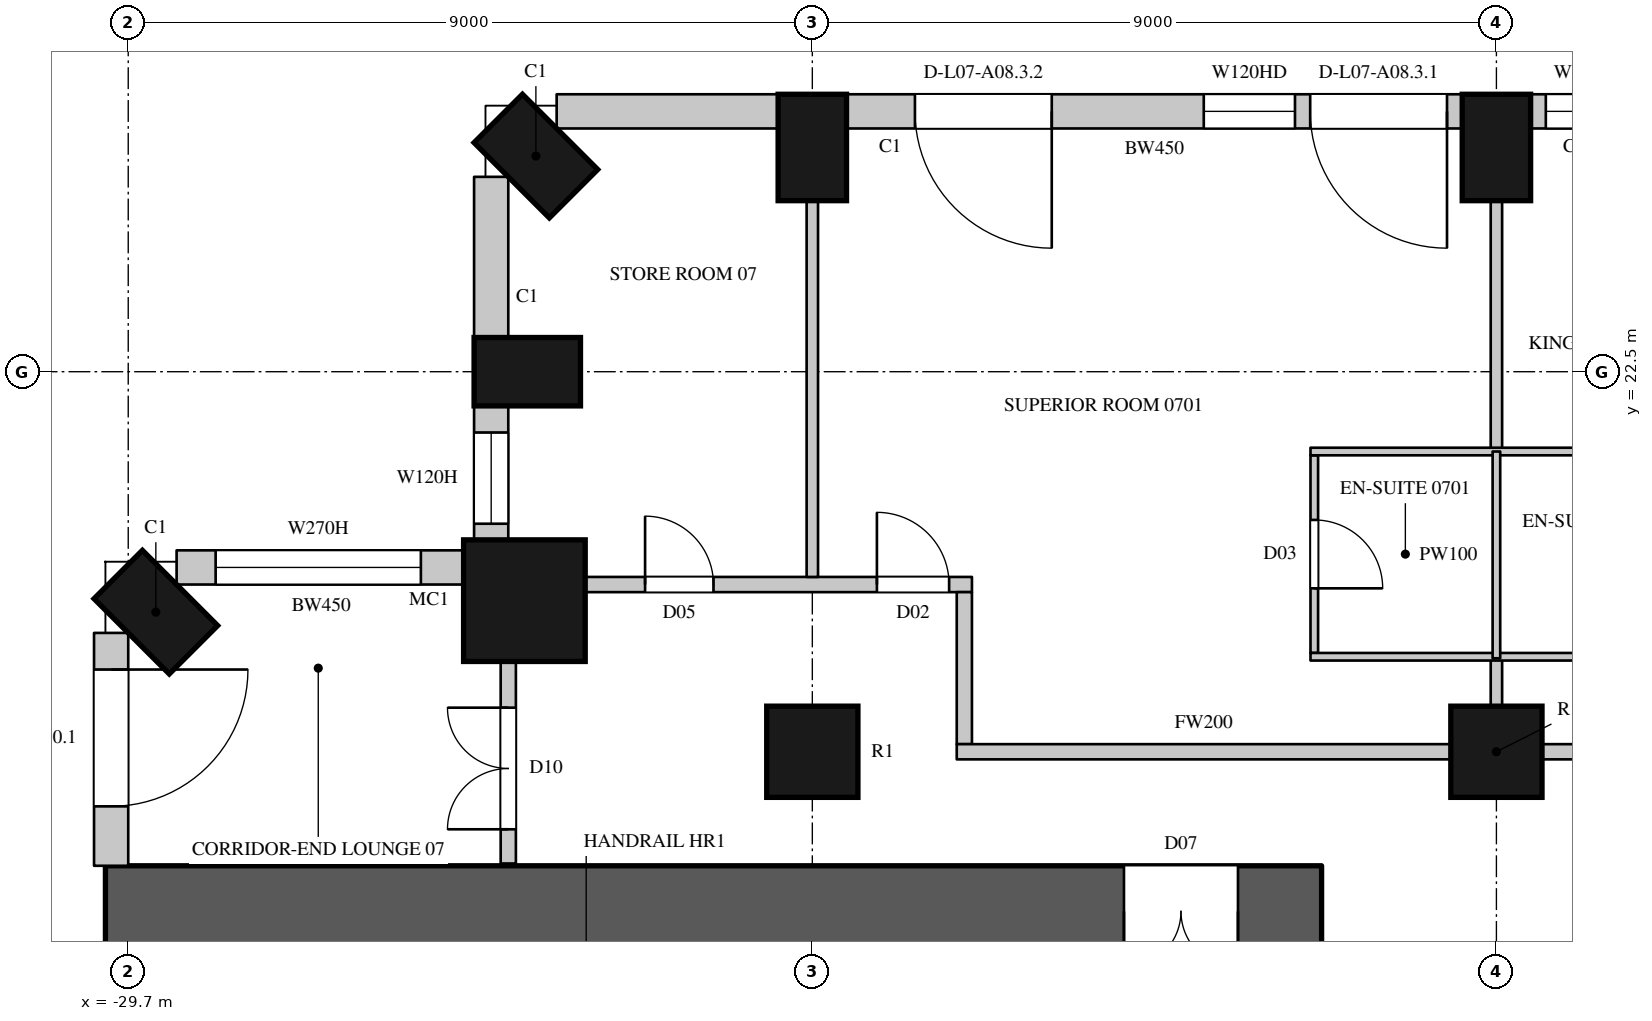
"""IFC4 building model, lengths in metres.
Left out: names, types, materials, properties, quantities, classifications, styles, units other than length and angle.
Written with IfcOpenShell. Run it as: python <this file> out.ifc"""

import sys

from ifc_helpers import new_model, si_unit, direction, frame, frame_2d, origin, origin_2d, place, context, subcontext, project, spatial, rectangle, circle, extrude, element, fill, save


model = new_model("IFC4")
c1 = context("Model", 3, precision=1e-05, world=origin(), true_north=direction((0.0, 1.0)))
c2 = subcontext(c1, "Body", "Model", "MODEL_VIEW")
j1 = project(units=[si_unit("LENGTHUNIT", "METRE"), si_unit("PLANEANGLEUNIT", "RADIAN")], contexts=[c1])
p1 = place(None, origin())
s1 = spatial("IfcSite", under=j1, at=p1, CompositionType="ELEMENT")
p2 = place(p1, origin())
s2 = spatial("IfcBuilding", under=s1, at=p2, CompositionType="ELEMENT")
p3 = place(p2, frame((0.0, 0.0, 55.5)))
s3 = spatial("IfcBuildingStorey", under=s2, at=p3, CompositionType="ELEMENT", Elevation=55.5)
for number, where, z_axis, x_axis in (
    (1, (-29.337, 19.337, 0.0), (0.0, 0.0, 1.0), (-0.707, -0.707, 0.0)),
    (2, (-11.7, 25.45, 0.0), (0.0, 0.0, 1.0), (-1.0, 0.0, 0.0)),
    (3, (-20.7, 25.45, 0.0), (0.0, 0.0, 1.0), (-1.0, 0.0, 0.0)),
    (4, (-24.337, 25.337, 0.0), (0.0, 0.0, 1.0), (-0.707, -0.707, 0.0)),
    (5, (-24.45, 22.5, 0.0), (0.0, 0.0, 1.0), (0.0, -1.0, 0.0)),
):
    element("IfcColumn", number, at=place(p3, frame(where, z_axis=z_axis, x_axis=x_axis)), inside=s3, PredefinedType="COLUMN", context=c2, shape_type="SweptSolid", body=[
        extrude(rectangle(XDim=0.9, YDim=1.4, at=origin_2d()), origin(), (0.0, 0.0, 1.0), 3.6),
    ])
p4 = place(p3, frame((-24.488, 19.488, 0.0), z_axis=(0.0, 0.0, 1.0), x_axis=(1.0, 0.0, 0.0)))
e6 = element("IfcColumn", 6, at=p4, inside=s3, PredefinedType="COLUMN", context=c2, shape_type="SweptSolid", body=[
    extrude(circle(Radius=0.8, at=origin_2d()), origin(), (0.0, 0.0, 1.0), 3.6),
])
for number, where, z_axis, x_axis in (
    (7, (-20.7, 17.5, 0.0), (0.0, 0.0, 1.0), (1.0, 0.0, 0.0)),
    (8, (-11.7, 17.5, 0.0), (0.0, 0.0, 1.0), (1.0, 0.0, 0.0)),
):
    element("IfcColumn", number, at=place(p3, frame(where, z_axis=z_axis, x_axis=x_axis)), inside=s3, PredefinedType="COLUMN", context=c2, shape_type="SweptSolid", body=[
        extrude(circle(Radius=0.6, at=origin_2d()), origin(), (0.0, 0.0, 1.0), 3.6),
    ])
p5 = place(p3, frame((-29.925, 19.064, 0.0), z_axis=(0.0, 0.0, 1.0), x_axis=(0.0, -1.0, 0.0)))
e9 = element("IfcWall", 9, at=p5, inside=s3, PredefinedType="SOLIDWALL", context=c2, shape_type="SweptSolid", body=[
    extrude(rectangle(XDim=3.064, YDim=0.45, at=frame_2d((1.532, 0.0))), origin(), (0.0, 0.0, 1.0), 3.3),
])
p6 = place(p5, frame((0.482, 0.0, 0.0)))
e10 = element("IfcOpeningElement", 10, at=p6, cuts=e9, PredefinedType="OPENING", context=c2, shape_type="SweptSolid", body=[
    extrude(rectangle(XDim=1.8, YDim=2.4, at=frame_2d((0.9, 1.2))), frame((0.0, 0.235, 0.0), z_axis=(0.0, -1.0, 0.0), x_axis=(1.0, 0.0, 0.0)), (0.0, 0.0, 1.0), 0.47),
])
p7 = place(p3, frame((-3.15, 25.925, 0.0), z_axis=(0.0, 0.0, 1.0), x_axis=(-1.0, 0.0, 0.0)))
e11 = element("IfcWall", 11, at=p7, inside=s3, PredefinedType="SOLIDWALL", context=c2, shape_type="SweptSolid", body=[
    extrude(rectangle(XDim=8.1, YDim=0.45, at=frame_2d((4.05, 0.0))), origin(), (0.0, 0.0, 1.0), 3.3),
])
p8 = place(p7, frame((0.2, 0.0, 0.0)))
e12 = element("IfcOpeningElement", 12, at=p8, cuts=e11, PredefinedType="OPENING", context=c2, shape_type="SweptSolid", body=[
    extrude(rectangle(XDim=1.8, YDim=2.4, at=frame_2d((0.9, 1.2))), frame((0.0, 0.235, 0.0), z_axis=(0.0, -1.0, 0.0), x_axis=(1.0, 0.0, 0.0)), (0.0, 0.0, 1.0), 0.47),
])
p9 = place(p7, frame((2.2, 0.0, 1.05)))
e13 = element("IfcOpeningElement", 13, at=p9, cuts=e11, PredefinedType="OPENING", context=c2, shape_type="SweptSolid", body=[
    extrude(rectangle(XDim=1.2, YDim=2.0, at=frame_2d((0.6, 1.0))), frame((0.0, 0.235, 0.0), z_axis=(0.0, -1.0, 0.0), x_axis=(1.0, 0.0, 0.0)), (0.0, 0.0, 1.0), 0.47),
])
p10 = place(p7, frame((4.7, 0.0, 0.0)))
e14 = element("IfcOpeningElement", 14, at=p10, cuts=e11, PredefinedType="OPENING", context=c2, shape_type="SweptSolid", body=[
    extrude(rectangle(XDim=1.8, YDim=2.4, at=frame_2d((0.9, 1.2))), frame((0.0, 0.235, 0.0), z_axis=(0.0, -1.0, 0.0), x_axis=(1.0, 0.0, 0.0)), (0.0, 0.0, 1.0), 0.47),
])
p11 = place(p7, frame((6.7, 0.0, 1.05)))
e15 = element("IfcOpeningElement", 15, at=p11, cuts=e11, PredefinedType="OPENING", context=c2, shape_type="SweptSolid", body=[
    extrude(rectangle(XDim=1.2, YDim=2.0, at=frame_2d((0.6, 1.0))), frame((0.0, 0.235, 0.0), z_axis=(0.0, -1.0, 0.0), x_axis=(1.0, 0.0, 0.0)), (0.0, 0.0, 1.0), 0.47),
])
p12 = place(p3, frame((-12.15, 25.925, 0.0), z_axis=(0.0, 0.0, 1.0), x_axis=(-1.0, 0.0, 0.0)))
e16 = element("IfcWall", 16, at=p12, inside=s3, PredefinedType="SOLIDWALL", context=c2, shape_type="SweptSolid", body=[
    extrude(rectangle(XDim=8.1, YDim=0.45, at=frame_2d((4.05, 0.0))), origin(), (0.0, 0.0, 1.0), 3.3),
])
p13 = place(p12, frame((0.2, 0.0, 0.0)))
e17 = element("IfcOpeningElement", 17, at=p13, cuts=e16, PredefinedType="OPENING", context=c2, shape_type="SweptSolid", body=[
    extrude(rectangle(XDim=1.8, YDim=2.4, at=frame_2d((0.9, 1.2))), frame((0.0, 0.235, 0.0), z_axis=(0.0, -1.0, 0.0), x_axis=(1.0, 0.0, 0.0)), (0.0, 0.0, 1.0), 0.47),
])
p14 = place(p12, frame((2.2, 0.0, 1.05)))
e18 = element("IfcOpeningElement", 18, at=p14, cuts=e16, PredefinedType="OPENING", context=c2, shape_type="SweptSolid", body=[
    extrude(rectangle(XDim=1.2, YDim=2.0, at=frame_2d((0.6, 1.0))), frame((0.0, 0.235, 0.0), z_axis=(0.0, -1.0, 0.0), x_axis=(1.0, 0.0, 0.0)), (0.0, 0.0, 1.0), 0.47),
])
p15 = place(p12, frame((5.4, 0.0, 0.0)))
e19 = element("IfcOpeningElement", 19, at=p15, cuts=e16, PredefinedType="OPENING", context=c2, shape_type="SweptSolid", body=[
    extrude(rectangle(XDim=1.8, YDim=2.4, at=frame_2d((0.9, 1.2))), frame((0.0, 0.235, 0.0), z_axis=(0.0, -1.0, 0.0), x_axis=(1.0, 0.0, 0.0)), (0.0, 0.0, 1.0), 0.47),
])
p16 = place(p3, frame((-21.15, 25.925, 0.0), z_axis=(0.0, 0.0, 1.0), x_axis=(-1.0, 0.0, 0.0)))
e20 = element("IfcWall", 20, at=p16, inside=s3, PredefinedType="SOLIDWALL", context=c2, shape_type="SweptSolid", body=[
    extrude(rectangle(XDim=2.914, YDim=0.45, at=frame_2d((1.457, 0.0))), origin(), (0.0, 0.0, 1.0), 3.3),
])
p17 = place(p3, frame((-24.925, 25.064, 0.0), z_axis=(0.0, 0.0, 1.0), x_axis=(0.0, -1.0, 0.0)))
e21 = element("IfcWall", 21, at=p17, inside=s3, PredefinedType="SOLIDWALL", context=c2, shape_type="SweptSolid", body=[
    extrude(rectangle(XDim=2.114, YDim=0.45, at=frame_2d((1.057, 0.0))), origin(), (0.0, 0.0, 1.0), 3.3),
])
p18 = place(p3, frame((-24.925, 22.05, 0.0), z_axis=(0.0, 0.0, 1.0), x_axis=(0.0, -1.0, 0.0)))
e22 = element("IfcWall", 22, at=p18, inside=s3, PredefinedType="SOLIDWALL", context=c2, shape_type="SweptSolid", body=[
    extrude(rectangle(XDim=1.792, YDim=0.45, at=frame_2d((0.896, 0.0))), origin(), (0.0, 0.0, 1.0), 3.3),
])
p19 = place(p18, frame((0.35, 0.0, 1.05)))
e23 = element("IfcOpeningElement", 23, at=p19, cuts=e22, PredefinedType="OPENING", context=c2, shape_type="SweptSolid", body=[
    extrude(rectangle(XDim=1.2, YDim=2.0, at=frame_2d((0.6, 1.0))), frame((0.0, 0.235, 0.0), z_axis=(0.0, -1.0, 0.0), x_axis=(1.0, 0.0, 0.0)), (0.0, 0.0, 1.0), 0.47),
])
p20 = place(p3, frame((-25.259, 19.925, 0.0), z_axis=(0.0, 0.0, 1.0), x_axis=(-1.0, 0.0, 0.0)))
e24 = element("IfcWall", 24, at=p20, inside=s3, PredefinedType="SOLIDWALL", context=c2, shape_type="SweptSolid", body=[
    extrude(rectangle(XDim=3.805, YDim=0.45, at=frame_2d((1.903, 0.0))), origin(), (0.0, 0.0, 1.0), 3.3),
])
p21 = place(p20, frame((0.592, 0.0, 1.05)))
e25 = element("IfcOpeningElement", 25, at=p21, cuts=e24, PredefinedType="OPENING", context=c2, shape_type="SweptSolid", body=[
    extrude(rectangle(XDim=2.7, YDim=2.0, at=frame_2d((1.35, 1.0))), frame((0.0, 0.235, 0.0), z_axis=(0.0, -1.0, 0.0), x_axis=(1.0, 0.0, 0.0)), (0.0, 0.0, 1.0), 0.47),
])
p22 = place(p3, frame((-30.0, 15.4, 0.0), z_axis=(0.0, 0.0, 1.0), x_axis=(1.0, 0.0, 0.0)))
e26 = element("IfcWall", 26, at=p22, inside=s3, PredefinedType="SHEAR", context=c2, shape_type="SweptSolid", body=[
    extrude(rectangle(XDim=16.0, YDim=1.2, at=frame_2d((8.0, 0.0))), origin(), (0.0, 0.0, 1.0), 3.6),
])
p23 = place(p22, frame((13.4, 0.0, 0.0)))
e27 = element("IfcOpeningElement", 27, at=p23, cuts=e26, PredefinedType="OPENING", context=c2, shape_type="SweptSolid", body=[
    extrude(rectangle(XDim=1.5, YDim=2.4, at=frame_2d((0.75, 1.2))), frame((0.0, 0.61, 0.0), z_axis=(0.0, -1.0, 0.0), x_axis=(1.0, 0.0, 0.0)), (0.0, 0.0, 1.0), 1.22),
])
p24 = place(p3, frame((-24.7, 16.03, 0.0), z_axis=(0.0, 0.0, 1.0), x_axis=(0.0, 1.0, 0.0)))
e28 = element("IfcWall", 28, at=p24, inside=s3, PredefinedType="PARTITIONING", context=c2, shape_type="SweptSolid", body=[
    extrude(rectangle(XDim=2.67, YDim=0.2, at=frame_2d((1.335, 0.0))), origin(), (0.0, 0.0, 1.0), 3.3),
])
p25 = place(p24, frame((0.45, 0.0, 0.0)))
e29 = element("IfcOpeningElement", 29, at=p25, cuts=e28, PredefinedType="OPENING", context=c2, shape_type="SweptSolid", body=[
    extrude(rectangle(XDim=1.6, YDim=2.4, at=frame_2d((0.8, 1.2))), frame((0.0, 0.11, 0.0), z_axis=(0.0, -1.0, 0.0), x_axis=(1.0, 0.0, 0.0)), (0.0, 0.0, 1.0), 0.22),
])
p26 = place(p3, frame((-23.7, 19.7, 0.0), z_axis=(0.0, 0.0, 1.0), x_axis=(1.0, 0.0, 0.0)))
e30 = element("IfcWall", 30, at=p26, inside=s3, PredefinedType="PARTITIONING", context=c2, shape_type="SweptSolid", body=[
    extrude(rectangle(XDim=5.1, YDim=0.2, at=frame_2d((2.55, 0.0))), origin(), (0.0, 0.0, 1.0), 3.3),
])
p27 = place(p26, frame((0.8, 0.0, 0.0)))
e31 = element("IfcOpeningElement", 31, at=p27, cuts=e30, PredefinedType="OPENING", context=c2, shape_type="SweptSolid", body=[
    extrude(rectangle(XDim=0.9, YDim=2.2, at=frame_2d((0.45, 1.1))), frame((0.0, 0.11, 0.0), z_axis=(0.0, -1.0, 0.0), x_axis=(1.0, 0.0, 0.0)), (0.0, 0.0, 1.0), 0.22),
])
p28 = place(p26, frame((3.85, 0.0, 0.0)))
e32 = element("IfcOpeningElement", 32, at=p28, cuts=e30, PredefinedType="OPENING", context=c2, shape_type="SweptSolid", body=[
    extrude(rectangle(XDim=0.95, YDim=2.2, at=frame_2d((0.475, 1.1))), frame((0.0, 0.11, 0.0), z_axis=(0.0, -1.0, 0.0), x_axis=(1.0, 0.0, 0.0)), (0.0, 0.0, 1.0), 0.22),
])
p29 = place(p3, frame((-18.7, 17.6, 0.0), z_axis=(0.0, 0.0, 1.0), x_axis=(0.0, 1.0, 0.0)))
e33 = element("IfcWall", 33, at=p29, inside=s3, PredefinedType="PARTITIONING", context=c2, shape_type="SweptSolid", body=[
    extrude(rectangle(XDim=2.0, YDim=0.2, at=frame_2d((1.0, 0.0))), origin(), (0.0, 0.0, 1.0), 3.3),
])
p30 = place(p3, frame((-18.8, 17.5, 0.0), z_axis=(0.0, 0.0, 1.0), x_axis=(1.0, 0.0, 0.0)))
e34 = element("IfcWall", 34, at=p30, inside=s3, PredefinedType="PARTITIONING", context=c2, shape_type="SweptSolid", body=[
    extrude(rectangle(XDim=6.5, YDim=0.2, at=frame_2d((3.25, 0.0))), origin(), (0.0, 0.0, 1.0), 2.75),
])
p31 = place(p3, frame((-11.1, 17.5, 0.0), z_axis=(0.0, 0.0, 1.0), x_axis=(1.0, 0.0, 0.0)))
e35 = element("IfcWall", 35, at=p31, inside=s3, PredefinedType="PARTITIONING", context=c2, shape_type="SweptSolid", body=[
    extrude(rectangle(XDim=7.8, YDim=0.2, at=frame_2d((3.9, 0.0))), origin(), (0.0, 0.0, 1.0), 2.75),
])
p32 = place(p31, frame((2.35, 0.0, 0.0)))
e36 = element("IfcOpeningElement", 36, at=p32, cuts=e35, PredefinedType="OPENING", context=c2, shape_type="SweptSolid", body=[
    extrude(rectangle(XDim=0.95, YDim=2.2, at=frame_2d((0.475, 1.1))), frame((0.0, 0.11, 0.0), z_axis=(0.0, -1.0, 0.0), x_axis=(1.0, 0.0, 0.0)), (0.0, 0.0, 1.0), 0.22),
])
p33 = place(p31, frame((5.2, 0.0, 0.0)))
e37 = element("IfcOpeningElement", 37, at=p33, cuts=e35, PredefinedType="OPENING", context=c2, shape_type="SweptSolid", body=[
    extrude(rectangle(XDim=0.95, YDim=2.2, at=frame_2d((0.475, 1.1))), frame((0.0, 0.11, 0.0), z_axis=(0.0, -1.0, 0.0), x_axis=(1.0, 0.0, 0.0)), (0.0, 0.0, 1.0), 0.22),
])
p34 = place(p3, frame((-20.7, 19.8, 0.0), z_axis=(0.0, 0.0, 1.0), x_axis=(0.0, 1.0, 0.0)))
e38 = element("IfcWall", 38, at=p34, inside=s3, PredefinedType="PARTITIONING", context=c2, shape_type="SweptSolid", body=[
    extrude(rectangle(XDim=4.95, YDim=0.15, at=frame_2d((2.475, 0.0))), origin(), (0.0, 0.0, 1.0), 2.75),
])
p35 = place(p3, frame((-11.7, 18.1, 0.0), z_axis=(0.0, 0.0, 1.0), x_axis=(0.0, 1.0, 0.0)))
e39 = element("IfcWall", 39, at=p35, inside=s3, PredefinedType="PARTITIONING", context=c2, shape_type="SweptSolid", body=[
    extrude(rectangle(XDim=0.63, YDim=0.15, at=frame_2d((0.315, 0.0))), origin(), (0.0, 0.0, 1.0), 2.75),
])
p36 = place(p3, frame((-11.7, 21.45, 0.0), z_axis=(0.0, 0.0, 1.0), x_axis=(0.0, 1.0, 0.0)))
e40 = element("IfcWall", 40, at=p36, inside=s3, PredefinedType="PARTITIONING", context=c2, shape_type="SweptSolid", body=[
    extrude(rectangle(XDim=3.3, YDim=0.15, at=frame_2d((1.65, 0.0))), origin(), (0.0, 0.0, 1.0), 2.75),
])
p37 = place(p3, frame((-14.096, 18.8, 0.0), z_axis=(0.0, 0.0, 1.0), x_axis=(0.0, 1.0, 0.0)))
e41 = element("IfcWall", 41, at=p37, inside=s3, PredefinedType="PARTITIONING", context=c2, shape_type="SweptSolid", body=[
    extrude(rectangle(XDim=2.6, YDim=0.1, at=frame_2d((1.3, 0.0))), origin(), (0.0, 0.0, 1.0), 3.3),
])
p38 = place(p37, frame((0.85, 0.0, 0.0)))
e42 = element("IfcOpeningElement", 42, at=p38, cuts=e41, PredefinedType="OPENING", context=c2, shape_type="SweptSolid", body=[
    extrude(rectangle(XDim=0.9, YDim=2.2, at=frame_2d((0.45, 1.1))), frame((0.0, 0.06, 0.0), z_axis=(0.0, -1.0, 0.0), x_axis=(1.0, 0.0, 0.0)), (0.0, 0.0, 1.0), 0.12),
])
p39 = place(p3, frame((-14.146, 18.75, 0.0), z_axis=(0.0, 0.0, 1.0), x_axis=(1.0, 0.0, 0.0)))
e43 = element("IfcWall", 43, at=p39, inside=s3, PredefinedType="PARTITIONING", context=c2, shape_type="SweptSolid", body=[
    extrude(rectangle(XDim=4.892, YDim=0.1, at=frame_2d((2.446, 0.0))), origin(), (0.0, 0.0, 1.0), 3.3),
])
p40 = place(p39, frame((3.75, 0.0, 0.0)))
e44 = element("IfcOpeningElement", 44, at=p40, cuts=e43, PredefinedType="OPENING", context=c2, shape_type="SweptSolid", body=[
    extrude(rectangle(XDim=0.9, YDim=2.2, at=frame_2d((0.45, 1.1))), frame((0.0, 0.06, 0.0), z_axis=(0.0, -1.0, 0.0), x_axis=(1.0, 0.0, 0.0)), (0.0, 0.0, 1.0), 0.12),
])
p41 = place(p3, frame((-14.146, 21.45, 0.0), z_axis=(0.0, 0.0, 1.0), x_axis=(1.0, 0.0, 0.0)))
e45 = element("IfcWall", 45, at=p41, inside=s3, PredefinedType="PARTITIONING", context=c2, shape_type="SweptSolid", body=[
    extrude(rectangle(XDim=4.892, YDim=0.1, at=frame_2d((2.446, 0.0))), origin(), (0.0, 0.0, 1.0), 3.3),
])
p42 = place(p3, frame((-11.7, 18.73, 0.0), z_axis=(0.0, 0.0, 1.0), x_axis=(0.0, 1.0, 0.0)))
e46 = element("IfcWall", 46, at=p42, inside=s3, PredefinedType="PARTITIONING", context=c2, shape_type="SweptSolid", body=[
    extrude(rectangle(XDim=2.72, YDim=0.1, at=frame_2d((1.36, 0.0))), origin(), (0.0, 0.0, 1.0), 2.75),
])
p43 = place(p6, origin())
e47 = element("IfcDoor", 47, at=p43, inside=s3, OperationType="SLIDING_TO_LEFT", PredefinedType="DOOR", context=c2, shape_type="SweptSolid", body=[
    extrude(rectangle(XDim=1.8, YDim=2.4, at=frame_2d((0.9, 1.2))), frame((0.0, 0.13, 0.0), z_axis=(0.0, -1.0, 0.0), x_axis=(1.0, 0.0, 0.0)), (0.0, 0.0, 1.0), 0.05),
])
fill(e10, e47)
p44 = place(p11, origin())
e48 = element("IfcWindow", 48, at=p44, inside=s3, PartitioningType="SINGLE_PANEL", PredefinedType="WINDOW", context=c2, shape_type="SweptSolid", body=[
    extrude(rectangle(XDim=1.2, YDim=2.0, at=frame_2d((0.6, 1.0))), frame((0.0, 0.135, 0.0), z_axis=(0.0, -1.0, 0.0), x_axis=(1.0, 0.0, 0.0)), (0.0, 0.0, 1.0), 0.06),
])
fill(e15, e48)
p45 = place(p13, origin())
e49 = element("IfcDoor", 49, at=p45, inside=s3, OperationType="SLIDING_TO_LEFT", PredefinedType="DOOR", context=c2, shape_type="SweptSolid", body=[
    extrude(rectangle(XDim=1.8, YDim=2.4, at=frame_2d((0.9, 1.2))), frame((0.0, 0.13, 0.0), z_axis=(0.0, -1.0, 0.0), x_axis=(1.0, 0.0, 0.0)), (0.0, 0.0, 1.0), 0.05),
])
fill(e17, e49)
p46 = place(p14, origin())
e50 = element("IfcWindow", 50, at=p46, inside=s3, PartitioningType="SINGLE_PANEL", PredefinedType="WINDOW", context=c2, shape_type="SweptSolid", body=[
    extrude(rectangle(XDim=1.2, YDim=2.0, at=frame_2d((0.6, 1.0))), frame((0.0, 0.135, 0.0), z_axis=(0.0, -1.0, 0.0), x_axis=(1.0, 0.0, 0.0)), (0.0, 0.0, 1.0), 0.06),
])
fill(e18, e50)
p47 = place(p15, origin())
e51 = element("IfcDoor", 51, at=p47, inside=s3, OperationType="SLIDING_TO_LEFT", PredefinedType="DOOR", context=c2, shape_type="SweptSolid", body=[
    extrude(rectangle(XDim=1.8, YDim=2.4, at=frame_2d((0.9, 1.2))), frame((0.0, 0.13, 0.0), z_axis=(0.0, -1.0, 0.0), x_axis=(1.0, 0.0, 0.0)), (0.0, 0.0, 1.0), 0.05),
])
fill(e19, e51)
p48 = place(p19, origin())
e52 = element("IfcWindow", 52, at=p48, inside=s3, PartitioningType="SINGLE_PANEL", PredefinedType="WINDOW", context=c2, shape_type="SweptSolid", body=[
    extrude(rectangle(XDim=1.2, YDim=2.0, at=frame_2d((0.6, 1.0))), frame((0.0, 0.135, 0.0), z_axis=(0.0, -1.0, 0.0), x_axis=(1.0, 0.0, 0.0)), (0.0, 0.0, 1.0), 0.06),
])
fill(e23, e52)
p49 = place(p21, origin())
e53 = element("IfcWindow", 53, at=p49, inside=s3, PartitioningType="SINGLE_PANEL", PredefinedType="WINDOW", context=c2, shape_type="SweptSolid", body=[
    extrude(rectangle(XDim=2.7, YDim=2.0, at=frame_2d((1.35, 1.0))), frame((0.0, 0.135, 0.0), z_axis=(0.0, -1.0, 0.0), x_axis=(1.0, 0.0, 0.0)), (0.0, 0.0, 1.0), 0.06),
])
fill(e25, e53)
p50 = place(p27, origin())
e54 = element("IfcDoor", 54, at=p50, inside=s3, OperationType="SINGLE_SWING_LEFT", PredefinedType="DOOR", context=c2, shape_type="SweptSolid", body=[
    extrude(rectangle(XDim=0.9, YDim=2.2, at=frame_2d((0.45, 1.1))), frame((0.0, 0.025, 0.0), z_axis=(0.0, -1.0, 0.0), x_axis=(1.0, 0.0, 0.0)), (0.0, 0.0, 1.0), 0.05),
])
fill(e31, e54)
p51 = place(p25, origin())
e55 = element("IfcDoor", 55, at=p51, inside=s3, OperationType="DOUBLE_DOOR_SINGLE_SWING", PredefinedType="DOOR", context=c2, shape_type="SweptSolid", body=[
    extrude(rectangle(XDim=1.6, YDim=2.4, at=frame_2d((0.8, 1.2))), frame((0.0, 0.025, 0.0), z_axis=(0.0, -1.0, 0.0), x_axis=(1.0, 0.0, 0.0)), (0.0, 0.0, 1.0), 0.05),
])
fill(e29, e55)
p52 = place(p28, origin())
e56 = element("IfcDoor", 56, at=p52, inside=s3, OperationType="SINGLE_SWING_LEFT", PredefinedType="DOOR", context=c2, shape_type="SweptSolid", body=[
    extrude(rectangle(XDim=0.95, YDim=2.2, at=frame_2d((0.475, 1.1))), frame((0.0, 0.025, 0.0), z_axis=(0.0, -1.0, 0.0), x_axis=(1.0, 0.0, 0.0)), (0.0, 0.0, 1.0), 0.05),
])
fill(e32, e56)
p53 = place(p38, origin())
e57 = element("IfcDoor", 57, at=p53, inside=s3, OperationType="SINGLE_SWING_RIGHT", PredefinedType="DOOR", context=c2, shape_type="SweptSolid", body=[
    extrude(rectangle(XDim=0.9, YDim=2.2, at=frame_2d((0.45, 1.1))), frame((0.0, 0.025, 0.0), z_axis=(0.0, -1.0, 0.0), x_axis=(1.0, 0.0, 0.0)), (0.0, 0.0, 1.0), 0.05),
])
fill(e42, e57)
p54 = place(p23, origin())
e58 = element("IfcDoor", 58, at=p54, inside=s3, OperationType="DOUBLE_DOOR_SINGLE_SWING", PredefinedType="DOOR", context=c2, shape_type="SweptSolid", body=[
    extrude(rectangle(XDim=1.5, YDim=2.4, at=frame_2d((0.75, 1.2))), frame((0.0, 0.025, 0.0), z_axis=(0.0, -1.0, 0.0), x_axis=(1.0, 0.0, 0.0)), (0.0, 0.0, 1.0), 0.05),
])
fill(e27, e58)
save(model, sys.argv[1])
